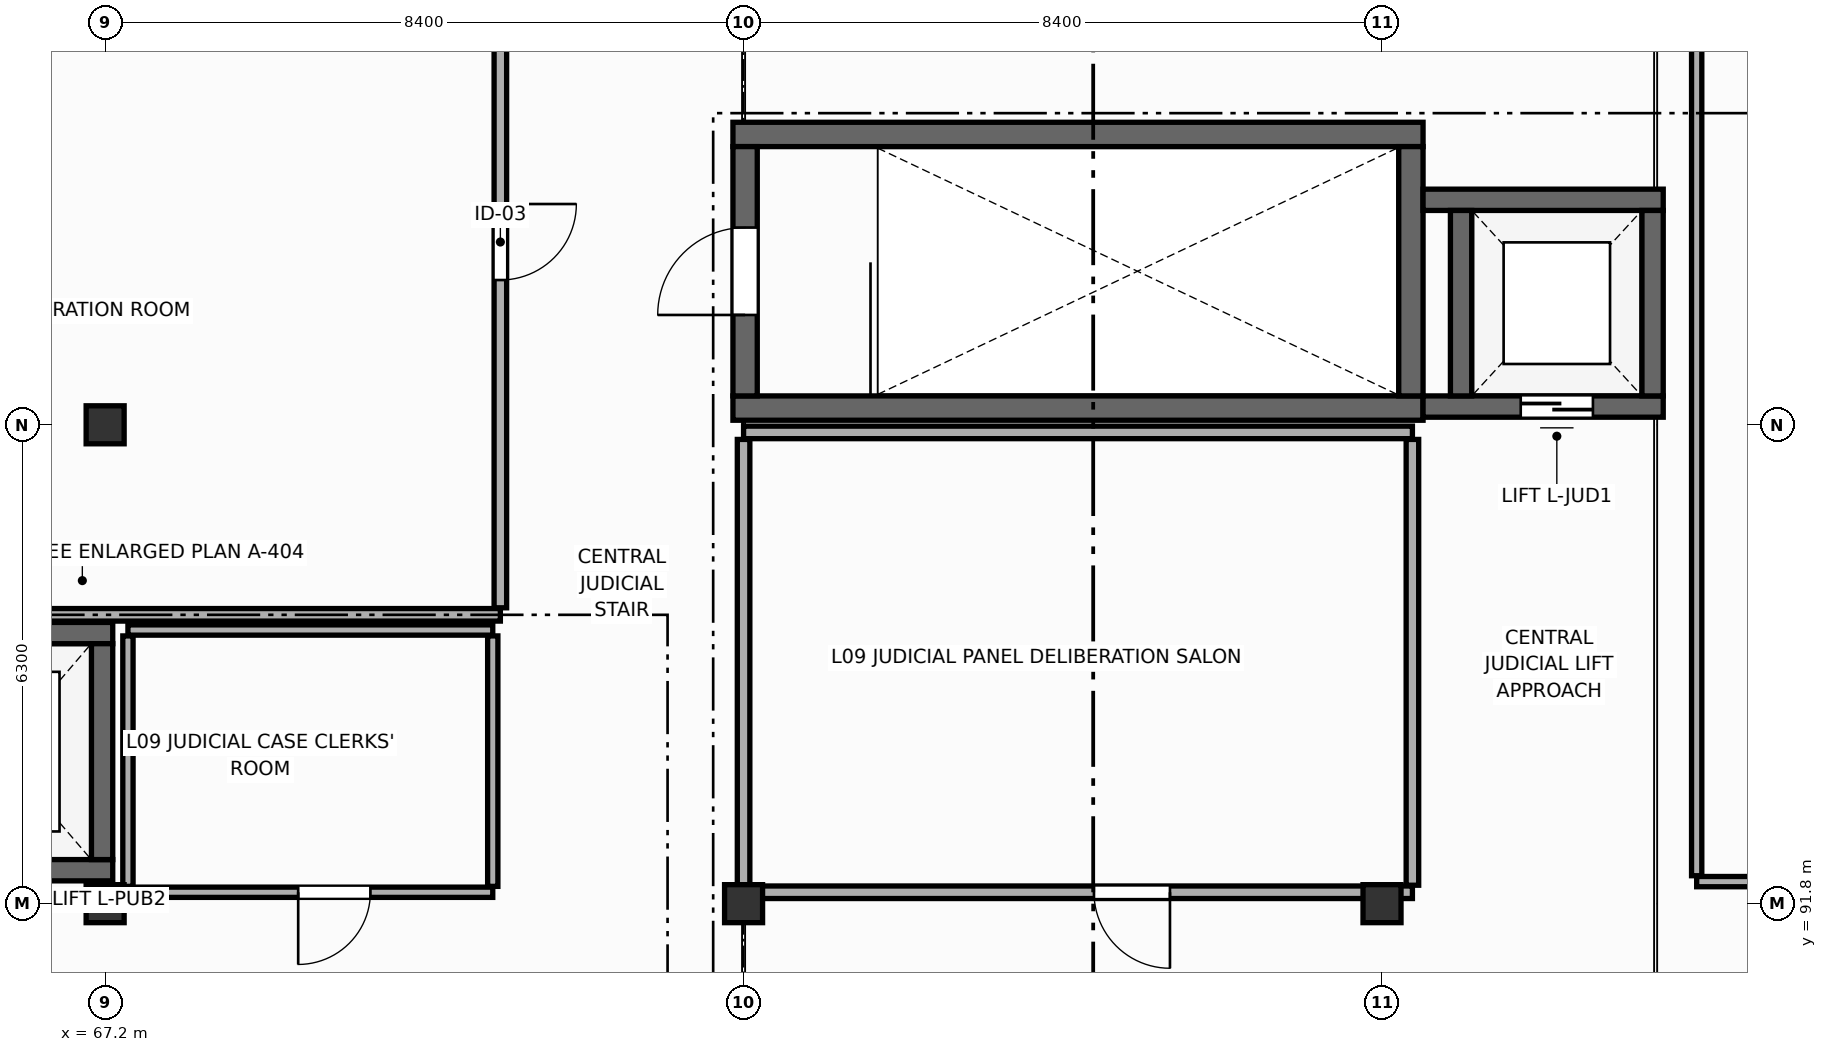
"""IFC4 building model, lengths in metres.
Left out: names, types, materials, properties, quantities, classifications, styles, units other than length and angle.
Written with IfcOpenShell. Run it as: python <this file> out.ifc"""

import sys

from ifc_helpers import new_model, si_unit, direction, frame, frame_2d, origin, origin_2d, place, context, subcontext, project, spatial, rectangle, extrude, element, fill, save


model = new_model("IFC4")
c1 = context("Model", 3, precision=1e-05, world=origin(), true_north=direction((0.0, 1.0)))
c2 = subcontext(c1, "Body", "Model", "MODEL_VIEW")
j1 = project(units=[si_unit("LENGTHUNIT", "METRE"), si_unit("PLANEANGLEUNIT", "RADIAN")], contexts=[c1])
p1 = place(None, origin())
s1 = spatial("IfcSite", under=j1, at=p1, CompositionType="ELEMENT")
p2 = place(p1, origin())
s2 = spatial("IfcBuilding", under=s1, at=p2, CompositionType="ELEMENT")
p3 = place(p2, frame((0.0, 0.0, 35.4)))
s3 = spatial("IfcBuildingStorey", under=s2, at=p3, CompositionType="ELEMENT", Elevation=35.4)
for number, where, z_axis, x_axis in (
    (1, (67.2, 91.8, 0.0), (0.0, 0.0, 1.0), (1.0, 0.0, 0.0)),
    (2, (67.2, 98.1, 0.0), (0.0, 0.0, 1.0), (1.0, 0.0, 0.0)),
    (3, (75.6, 91.8, 0.0), (0.0, 0.0, 1.0), (1.0, 0.0, 0.0)),
    (4, (84.0, 91.8, 0.0), (0.0, 0.0, 1.0), (1.0, 0.0, 0.0)),
):
    element("IfcColumn", number, at=place(p3, frame(where, z_axis=z_axis, x_axis=x_axis)), inside=s3, PredefinedType="COLUMN", context=c2, shape_type="SweptSolid", body=[
        extrude(rectangle(XDim=0.5, YDim=0.5, at=origin_2d()), origin(), (0.0, 0.0, 1.0), 4.2),
    ])
for number, where, z_axis, x_axis in (
    (5, (75.46, 101.92, 0.0), (0.0, 0.0, 1.0), (1.0, 0.0, 0.0)),
    (6, (84.54, 98.32, 0.0), (0.0, 0.0, 1.0), (-1.0, 0.0, 0.0)),
):
    element("IfcWall", number, at=place(p3, frame(where, z_axis=z_axis, x_axis=x_axis)), inside=s3, PredefinedType="SHEAR", context=c2, shape_type="SweptSolid", body=[
        extrude(rectangle(XDim=9.08, YDim=0.32, at=frame_2d((4.54, 0.0))), origin(), (0.0, 0.0, 1.0), 3.98),
    ])
p4 = place(p3, frame((75.62, 98.48, 0.0), z_axis=(0.0, 0.0, 1.0), x_axis=(0.0, 1.0, 0.0)))
e7 = element("IfcWall", 7, at=p4, inside=s3, PredefinedType="SHEAR", context=c2, shape_type="SweptSolid", body=[
    extrude(rectangle(XDim=3.28, YDim=0.32, at=frame_2d((1.64, 0.0))), origin(), (0.0, 0.0, 1.0), 3.98),
])
p5 = place(p4, frame((1.065, 0.0, 0.0)))
e8 = element("IfcOpeningElement", 8, at=p5, cuts=e7, PredefinedType="OPENING", context=c2, shape_type="SweptSolid", body=[
    extrude(rectangle(XDim=1.15, YDim=2.2, at=frame_2d((0.575, 1.1))), frame((0.0, 0.17, 0.0), z_axis=(0.0, -1.0, 0.0), x_axis=(1.0, 0.0, 0.0)), (0.0, 0.0, 1.0), 0.34),
])
p6 = place(p3, frame((84.38, 101.76, 0.0), z_axis=(0.0, 0.0, 1.0), x_axis=(0.0, -1.0, 0.0)))
e9 = element("IfcWall", 9, at=p6, inside=s3, PredefinedType="SHEAR", context=c2, shape_type="SweptSolid", body=[
    extrude(rectangle(XDim=3.28, YDim=0.32, at=frame_2d((1.64, 0.0))), origin(), (0.0, 0.0, 1.0), 3.98),
])
p7 = place(p3, frame((64.3, 95.36, 0.0), z_axis=(0.0, 0.0, 1.0), x_axis=(1.0, 0.0, 0.0)))
e10 = element("IfcWall", 10, at=p7, inside=s3, PredefinedType="SHEAR", context=c2, shape_type="SweptSolid", body=[
    extrude(rectangle(XDim=3.0, YDim=0.28, at=frame_2d((1.5, 0.0))), origin(), (0.0, 0.0, 1.0), 3.98),
])
p8 = place(p3, frame((67.3, 92.24, 0.0), z_axis=(0.0, 0.0, 1.0), x_axis=(-1.0, 0.0, 0.0)))
e11 = element("IfcWall", 11, at=p8, inside=s3, PredefinedType="SHEAR", context=c2, shape_type="SweptSolid", body=[
    extrude(rectangle(XDim=3.0, YDim=0.28, at=frame_2d((1.5, 0.0))), origin(), (0.0, 0.0, 1.0), 3.98),
])
p9 = place(p8, frame((0.975, 0.0, 0.0)))
e12 = element("IfcOpeningElement", 12, at=p9, cuts=e11, PredefinedType="OPENING", context=c2, shape_type="SweptSolid", body=[
    extrude(rectangle(XDim=1.05, YDim=2.2, at=frame_2d((0.525, 1.1))), frame((0.0, 0.15, 0.0), z_axis=(0.0, -1.0, 0.0), x_axis=(1.0, 0.0, 0.0)), (0.0, 0.0, 1.0), 0.3),
])
p10 = place(p3, frame((67.16, 95.22, 0.0), z_axis=(0.0, 0.0, 1.0), x_axis=(0.0, -1.0, 0.0)))
e13 = element("IfcWall", 13, at=p10, inside=s3, PredefinedType="SHEAR", context=c2, shape_type="SweptSolid", body=[
    extrude(rectangle(XDim=2.84, YDim=0.28, at=frame_2d((1.42, 0.0))), origin(), (0.0, 0.0, 1.0), 3.98),
])
p11 = place(p3, frame((84.54, 101.06, 0.0), z_axis=(0.0, 0.0, 1.0), x_axis=(1.0, 0.0, 0.0)))
e14 = element("IfcWall", 14, at=p11, inside=s3, PredefinedType="SHEAR", context=c2, shape_type="SweptSolid", body=[
    extrude(rectangle(XDim=3.16, YDim=0.28, at=frame_2d((1.58, 0.0))), origin(), (0.0, 0.0, 1.0), 3.98),
])
p12 = place(p3, frame((87.7, 98.34, 0.0), z_axis=(0.0, 0.0, 1.0), x_axis=(-1.0, 0.0, 0.0)))
e15 = element("IfcWall", 15, at=p12, inside=s3, PredefinedType="SHEAR", context=c2, shape_type="SweptSolid", body=[
    extrude(rectangle(XDim=3.16, YDim=0.28, at=frame_2d((1.58, 0.0))), origin(), (0.0, 0.0, 1.0), 3.98),
])
p13 = place(p12, frame((0.925, 0.0, 0.0)))
e16 = element("IfcOpeningElement", 16, at=p13, cuts=e15, PredefinedType="OPENING", context=c2, shape_type="SweptSolid", body=[
    extrude(rectangle(XDim=0.95, YDim=2.15, at=frame_2d((0.475, 1.075))), frame((0.0, 0.15, 0.0), z_axis=(0.0, -1.0, 0.0), x_axis=(1.0, 0.0, 0.0)), (0.0, 0.0, 1.0), 0.3),
])
for number, where, z_axis, x_axis in (
    (17, (85.04, 98.48, 0.0), (0.0, 0.0, 1.0), (0.0, 1.0, 0.0)),
    (18, (87.56, 100.92, 0.0), (0.0, 0.0, 1.0), (0.0, -1.0, 0.0)),
):
    element("IfcWall", number, at=place(p3, frame(where, z_axis=z_axis, x_axis=x_axis)), inside=s3, PredefinedType="SHEAR", context=c2, shape_type="SweptSolid", body=[
        extrude(rectangle(XDim=2.44, YDim=0.28, at=frame_2d((1.22, 0.0))), origin(), (0.0, 0.0, 1.0), 3.98),
    ])
p14 = place(p3, frame((72.4, 95.6, 0.0), z_axis=(0.0, 0.0, 1.0), x_axis=(-1.0, 0.0, 0.0)))
e19 = element("IfcWall", 19, at=p14, inside=s3, PredefinedType="PARTITIONING", context=c2, shape_type="SweptSolid", body=[
    extrude(rectangle(XDim=13.4, YDim=0.165, at=frame_2d((6.7, 0.0))), origin(), (0.0, 0.0, 1.0), 3.095),
])
p15 = place(p3, frame((72.4, 103.996, 0.0), z_axis=(0.0, 0.0, 1.0), x_axis=(0.0, -1.0, 0.0)))
e20 = element("IfcWall", 20, at=p15, inside=s3, PredefinedType="PARTITIONING", context=c2, shape_type="SweptSolid", body=[
    extrude(rectangle(XDim=8.304, YDim=0.165, at=frame_2d((4.152, 0.0))), origin(), (0.0, 0.0, 1.0), 3.95),
])
p16 = place(p15, frame((2.991, 0.0, 0.0)))
e21 = element("IfcOpeningElement", 21, at=p16, cuts=e20, PredefinedType="OPENING", context=c2, shape_type="SweptSolid", body=[
    extrude(rectangle(XDim=1.0, YDim=2.15, at=frame_2d((0.5, 1.075))), frame((0.0, 0.093, 0.0), z_axis=(0.0, -1.0, 0.0), x_axis=(1.0, 0.0, 0.0)), (0.0, 0.0, 1.0), 0.185),
])
p17 = place(p3, frame((67.5, 95.4, 0.0), z_axis=(0.0, 0.0, 1.0), x_axis=(1.0, 0.0, 0.0)))
e22 = element("IfcWall", 22, at=p17, inside=s3, PredefinedType="PARTITIONING", context=c2, shape_type="SweptSolid", body=[
    extrude(rectangle(XDim=4.8, YDim=0.135, at=frame_2d((2.4, 0.0))), origin(), (0.0, 0.0, 1.0), 3.495),
])
p18 = place(p3, frame((72.3, 91.95, 0.0), z_axis=(0.0, 0.0, 1.0), x_axis=(-1.0, 0.0, 0.0)))
e23 = element("IfcWall", 23, at=p18, inside=s3, PredefinedType="PARTITIONING", context=c2, shape_type="SweptSolid", body=[
    extrude(rectangle(XDim=4.8, YDim=0.135, at=frame_2d((2.4, 0.0))), origin(), (0.0, 0.0, 1.0), 3.395),
])
p19 = place(p18, frame((1.61, 0.0, 0.0)))
e24 = element("IfcOpeningElement", 24, at=p19, cuts=e23, PredefinedType="OPENING", context=c2, shape_type="SweptSolid", body=[
    extrude(rectangle(XDim=0.95, YDim=2.15, at=frame_2d((0.475, 1.075))), frame((0.0, 0.077, 0.0), z_axis=(0.0, -1.0, 0.0), x_axis=(1.0, 0.0, 0.0)), (0.0, 0.0, 1.0), 0.155),
])
for number, where, z_axis, x_axis in (
    (25, (67.5, 92.028, 0.0), (0.0, 0.0, 1.0), (0.0, 1.0, 0.0)),
    (26, (72.3, 95.323, 0.0), (0.0, 0.0, 1.0), (0.0, -1.0, 0.0)),
):
    element("IfcWall", number, at=place(p3, frame(where, z_axis=z_axis, x_axis=x_axis)), inside=s3, PredefinedType="PARTITIONING", context=c2, shape_type="SweptSolid", body=[
        extrude(rectangle(XDim=3.295, YDim=0.135, at=frame_2d((1.647, 0.0))), origin(), (0.0, 0.0, 1.0), 3.395),
    ])
p20 = place(p3, frame((75.6, 98.0, 0.0), z_axis=(0.0, 0.0, 1.0), x_axis=(1.0, 0.0, 0.0)))
e27 = element("IfcWall", 27, at=p20, inside=s3, PredefinedType="PARTITIONING", context=c2, shape_type="SweptSolid", body=[
    extrude(rectangle(XDim=8.8, YDim=0.165, at=frame_2d((4.4, 0.0))), origin(), (0.0, 0.0, 1.0), 3.095),
])
p21 = place(p3, frame((84.4, 91.95, 0.0), z_axis=(0.0, 0.0, 1.0), x_axis=(-1.0, 0.0, 0.0)))
e28 = element("IfcWall", 28, at=p21, inside=s3, PredefinedType="PARTITIONING", context=c2, shape_type="SweptSolid", body=[
    extrude(rectangle(XDim=8.8, YDim=0.165, at=frame_2d((4.4, 0.0))), origin(), (0.0, 0.0, 1.0), 3.095),
])
p22 = place(p21, frame((3.19, 0.0, 0.0)))
e29 = element("IfcOpeningElement", 29, at=p22, cuts=e28, PredefinedType="OPENING", context=c2, shape_type="SweptSolid", body=[
    extrude(rectangle(XDim=1.0, YDim=2.15, at=frame_2d((0.5, 1.075))), frame((0.0, 0.093, 0.0), z_axis=(0.0, -1.0, 0.0), x_axis=(1.0, 0.0, 0.0)), (0.0, 0.0, 1.0), 0.185),
])
for number, where, z_axis, x_axis in (
    (30, (75.6, 92.042, 0.0), (0.0, 0.0, 1.0), (0.0, 1.0, 0.0)),
    (31, (84.4, 97.907, 0.0), (0.0, 0.0, 1.0), (0.0, -1.0, 0.0)),
):
    element("IfcWall", number, at=place(p3, frame(where, z_axis=z_axis, x_axis=x_axis)), inside=s3, PredefinedType="PARTITIONING", context=c2, shape_type="SweptSolid", body=[
        extrude(rectangle(XDim=5.865, YDim=0.165, at=frame_2d((2.933, 0.0))), origin(), (0.0, 0.0, 1.0), 3.095),
    ])
p23 = place(p3, frame((95.746, 92.09, 0.0), z_axis=(0.0, 0.0, 1.0), x_axis=(-1.0, 0.0, 0.0)))
e32 = element("IfcWall", 32, at=p23, inside=s3, PredefinedType="PARTITIONING", context=c2, shape_type="SweptSolid", body=[
    extrude(rectangle(XDim=7.606, YDim=0.135, at=frame_2d((3.803, 0.0))), origin(), (0.0, 0.0, 1.0), 3.295),
])
p24 = place(p23, frame((5.059, 0.0, 0.0)))
e33 = element("IfcOpeningElement", 33, at=p24, cuts=e32, PredefinedType="OPENING", context=c2, shape_type="SweptSolid", body=[
    extrude(rectangle(XDim=1.02, YDim=2.15, at=frame_2d((0.51, 1.075))), frame((0.0, 0.077, 0.0), z_axis=(0.0, -1.0, 0.0), x_axis=(1.0, 0.0, 0.0)), (0.0, 0.0, 1.0), 0.155),
])
p25 = place(p3, frame((88.14, 92.167, 0.0), z_axis=(0.0, 0.0, 1.0), x_axis=(0.0, 1.0, 0.0)))
e34 = element("IfcWall", 34, at=p25, inside=s3, PredefinedType="PARTITIONING", context=c2, shape_type="SweptSolid", body=[
    extrude(rectangle(XDim=11.829, YDim=0.135, at=frame_2d((5.914, 0.0))), origin(), (0.0, 0.0, 1.0), 3.395),
])
p26 = place(p5, origin())
e35 = element("IfcDoor", 35, at=p26, inside=s3, OperationType="SINGLE_SWING_LEFT", PredefinedType="DOOR", context=c2, shape_type="SweptSolid", body=[
    extrude(rectangle(XDim=1.15, YDim=2.2, at=frame_2d((0.575, 1.1))), frame((0.0, 0.025, 0.0), z_axis=(0.0, -1.0, 0.0), x_axis=(1.0, 0.0, 0.0)), (0.0, 0.0, 1.0), 0.05),
])
fill(e8, e35)
p27 = place(p13, origin())
e36 = element("IfcDoor", 36, at=p27, inside=s3, OperationType="DOUBLE_DOOR_SLIDING", PredefinedType="DOOR", context=c2, shape_type="SweptSolid", body=[
    extrude(rectangle(XDim=0.95, YDim=2.15, at=frame_2d((0.475, 1.075))), frame((0.0, 0.025, 0.0), z_axis=(0.0, -1.0, 0.0), x_axis=(1.0, 0.0, 0.0)), (0.0, 0.0, 1.0), 0.05),
])
fill(e16, e36)
p28 = place(p16, origin())
e37 = element("IfcDoor", 37, at=p28, inside=s3, OperationType="SINGLE_SWING_LEFT", PredefinedType="DOOR", context=c2, shape_type="SweptSolid", body=[
    extrude(rectangle(XDim=1.0, YDim=2.15, at=frame_2d((0.5, 1.075))), frame((0.0, 0.025, 0.0), z_axis=(0.0, -1.0, 0.0), x_axis=(1.0, 0.0, 0.0)), (0.0, 0.0, 1.0), 0.05),
])
fill(e21, e37)
p29 = place(p19, origin())
e38 = element("IfcDoor", 38, at=p29, inside=s3, OperationType="SINGLE_SWING_RIGHT", PredefinedType="DOOR", context=c2, shape_type="SweptSolid", body=[
    extrude(rectangle(XDim=0.95, YDim=2.15, at=frame_2d((0.475, 1.075))), frame((0.0, 0.025, 0.0), z_axis=(0.0, -1.0, 0.0), x_axis=(1.0, 0.0, 0.0)), (0.0, 0.0, 1.0), 0.05),
])
fill(e24, e38)
p30 = place(p22, origin())
e39 = element("IfcDoor", 39, at=p30, inside=s3, OperationType="SINGLE_SWING_LEFT", PredefinedType="DOOR", context=c2, shape_type="SweptSolid", body=[
    extrude(rectangle(XDim=1.0, YDim=2.15, at=frame_2d((0.5, 1.075))), frame((0.0, 0.025, 0.0), z_axis=(0.0, -1.0, 0.0), x_axis=(1.0, 0.0, 0.0)), (0.0, 0.0, 1.0), 0.05),
])
fill(e29, e39)
save(model, sys.argv[1])
